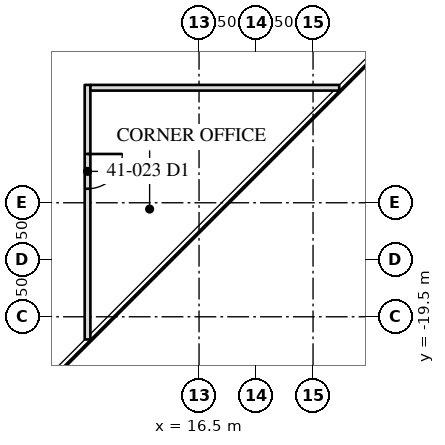
"""IFC4 building model, lengths in metres.
Left out: names, types, materials, properties, quantities, classifications, styles, units other than length and angle.
Written with IfcOpenShell. Run it as: python <this file> out.ifc"""

import sys

from ifc_helpers import new_model, si_unit, direction, frame, frame_2d, origin, place, context, subcontext, project, spatial, rectangle, extrude, element, fill, save


model = new_model("IFC4")
c1 = context("Model", 3, precision=1e-05, world=origin(), true_north=direction((0.0, 1.0)))
c2 = subcontext(c1, "Body", "Model", "MODEL_VIEW")
j1 = project(units=[si_unit("LENGTHUNIT", "METRE"), si_unit("PLANEANGLEUNIT", "RADIAN")], contexts=[c1])
p1 = place(None, origin())
s1 = spatial("IfcSite", under=j1, at=p1, CompositionType="ELEMENT")
p2 = place(p1, origin())
s2 = spatial("IfcBuilding", under=s1, at=p2, CompositionType="ELEMENT")
p3 = place(p2, frame((0.0, 0.0, 174.6)))
s3 = spatial("IfcBuildingStorey", under=s2, at=p3, CompositionType="ELEMENT", Elevation=174.6)
p4 = place(p3, frame((13.566, -13.399, 0.0), z_axis=(0.0, 0.0, 1.0), x_axis=(0.0, -1.0, 0.0)))
e1 = element("IfcWall", 1, at=p4, inside=s3, PredefinedType="PARTITIONING", context=c2, shape_type="SweptSolid", body=[
    extrude(rectangle(XDim=6.698, YDim=0.15, at=frame_2d((3.349, 0.0))), origin(), (0.0, 0.0, 1.0), 3.91),
])
p5 = place(p4, frame((1.817, 0.0, 0.0)))
e2 = element("IfcOpeningElement", 2, at=p5, cuts=e1, PredefinedType="OPENING", context=c2, shape_type="SweptSolid", body=[
    extrude(rectangle(XDim=0.915, YDim=2.134, at=frame_2d((0.458, 1.067))), frame((0.0, 0.085, 0.0), z_axis=(0.0, -1.0, 0.0), x_axis=(1.0, 0.0, 0.0)), (0.0, 0.0, 1.0), 0.17),
])
p6 = place(p3, frame((13.641, -13.474, 0.0), z_axis=(0.0, 0.0, 1.0), x_axis=(1.0, 0.0, 0.0)))
e3 = element("IfcWall", 3, at=p6, inside=s3, PredefinedType="PARTITIONING", context=c2, shape_type="SweptSolid", body=[
    extrude(rectangle(XDim=6.548, YDim=0.15, at=frame_2d((3.274, 0.0))), origin(), (0.0, 0.0, 1.0), 3.91),
])
p7 = place(p5, origin())
e4 = element("IfcDoor", 4, at=p7, inside=s3, OperationType="SINGLE_SWING_LEFT", PredefinedType="DOOR", context=c2, shape_type="SweptSolid", body=[
    extrude(rectangle(XDim=0.915, YDim=2.134, at=frame_2d((0.458, 1.067))), frame((0.0, 0.025, 0.0), z_axis=(0.0, -1.0, 0.0), x_axis=(1.0, 0.0, 0.0)), (0.0, 0.0, 1.0), 0.05),
])
fill(e2, e4)
save(model, sys.argv[1])
